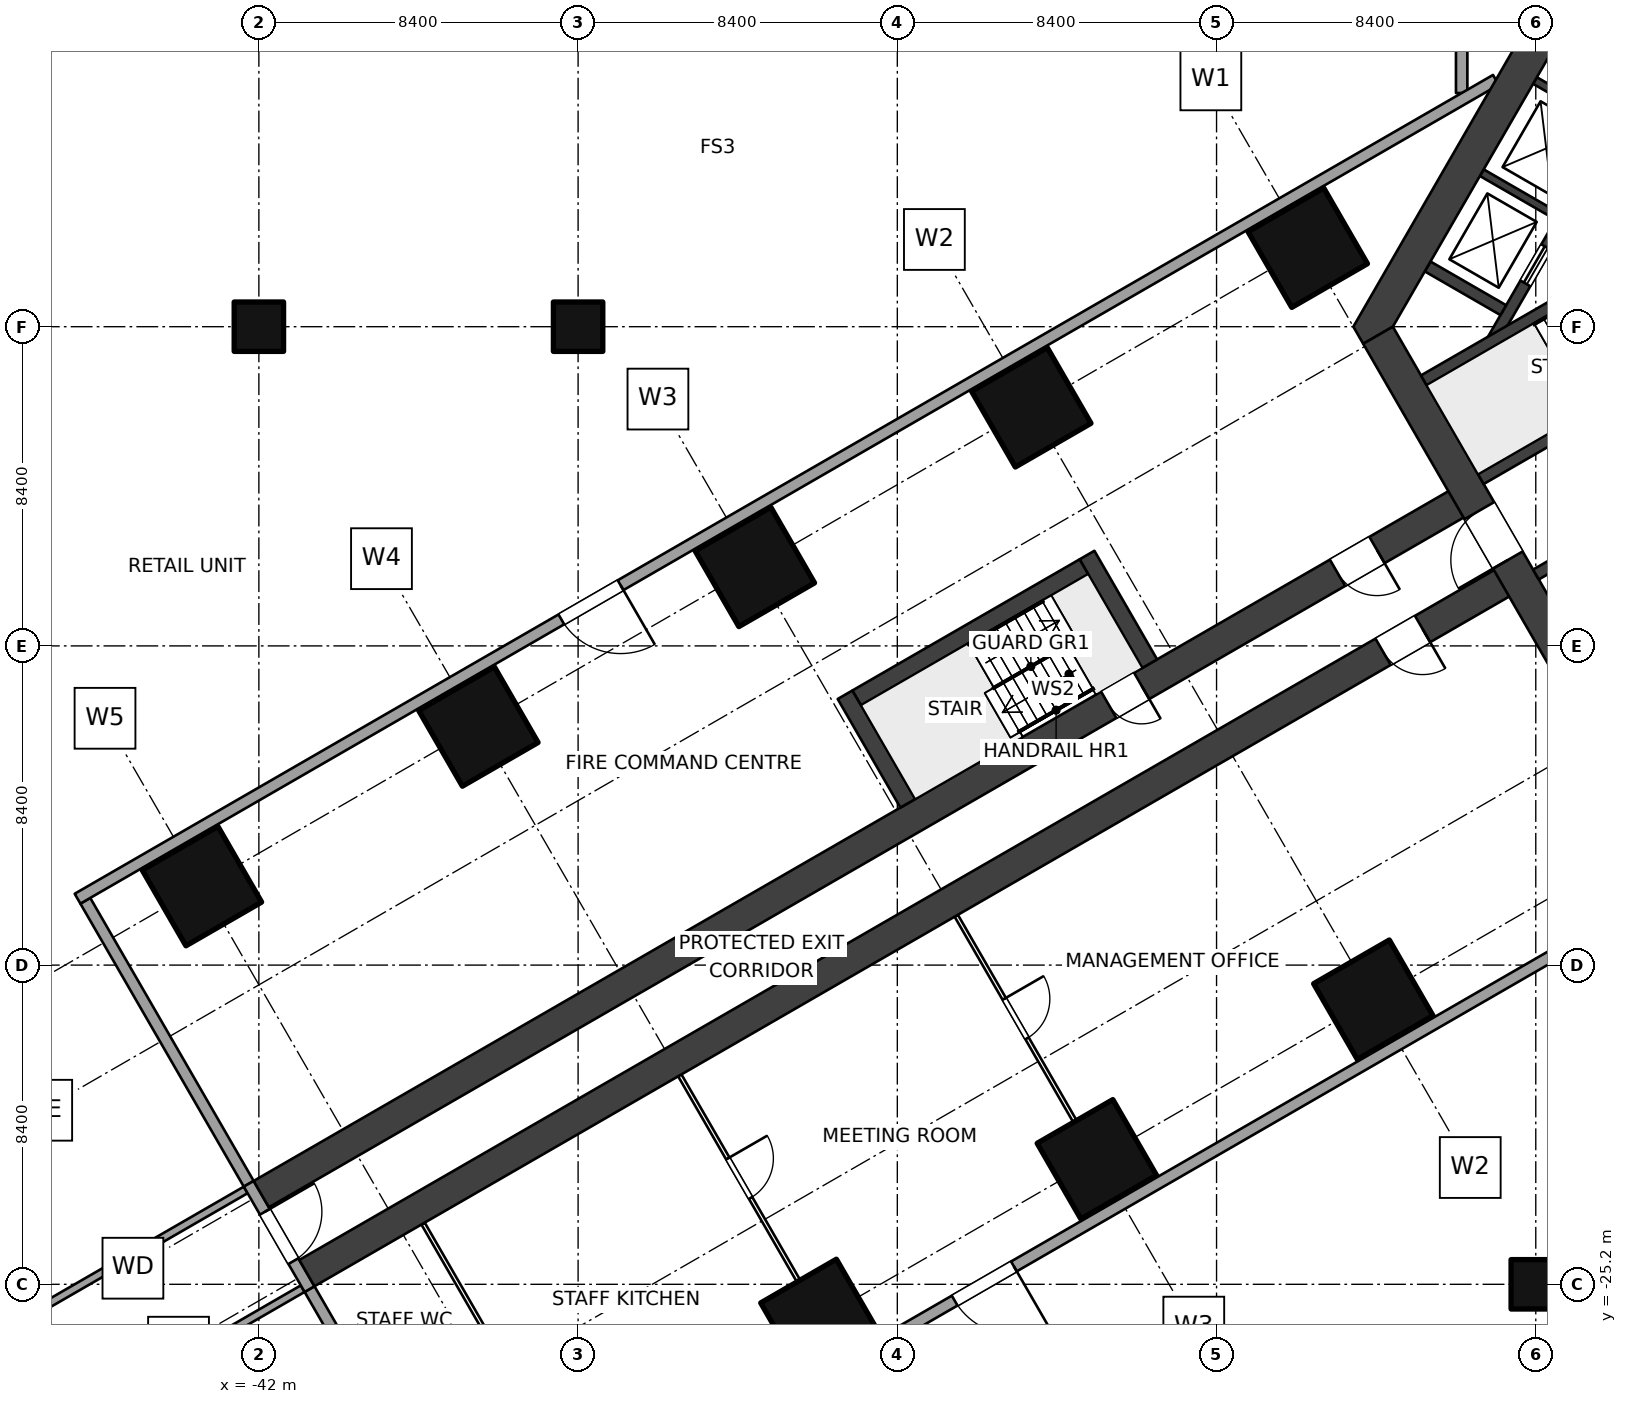
"""IFC4 building model, lengths in metres.
Left out: names, types, materials, properties, quantities, classifications, styles, units other than length and angle.
Written with IfcOpenShell. Run it as: python <this file> out.ifc"""

import sys

from ifc_helpers import new_model, si_unit, direction, frame, frame_2d, origin, origin_2d, place, context, subcontext, project, spatial, polyline, rectangle, outline, extrude, element, fill, save


model = new_model("IFC4")
c1 = context("Model", 3, precision=1e-05, world=origin(), true_north=direction((0.0, 1.0)))
c2 = subcontext(c1, "Body", "Model", "MODEL_VIEW")
j1 = project(units=[si_unit("LENGTHUNIT", "METRE"), si_unit("PLANEANGLEUNIT", "RADIAN")], contexts=[c1])
p1 = place(None, origin())
s1 = spatial("IfcSite", under=j1, at=p1, CompositionType="ELEMENT")
p2 = place(p1, origin())
s2 = spatial("IfcBuilding", under=s1, at=p2, CompositionType="ELEMENT")
p3 = place(p2, origin())
s3 = spatial("IfcBuildingStorey", under=s2, at=p3, CompositionType="ELEMENT", Elevation=0.0)
for number, where, z_axis, x_axis in (
    (1, (-14.4, 2.078, 0.0), (0.0, 0.0, 1.0), (-0.5, 0.866, 0.0)),
    (2, (-12.675, -17.71, 0.0), (0.0, 0.0, 1.0), (-0.5, 0.866, 0.0)),
    (3, (-21.675, -2.122, 0.0), (0.0, 0.0, 1.0), (-0.5, 0.866, 0.0)),
    (4, (-19.949, -21.91, 0.0), (0.0, 0.0, 1.0), (-0.5, 0.866, 0.0)),
    (5, (-28.949, -6.322, 0.0), (0.0, 0.0, 1.0), (-0.5, 0.866, 0.0)),
    (6, (-27.224, -26.11, 0.0), (0.0, 0.0, 1.0), (-0.5, 0.866, 0.0)),
    (7, (-36.224, -10.521, 0.0), (0.0, 0.0, 1.0), (-0.5, 0.866, 0.0)),
    (8, (-43.499, -14.721, 0.0), (0.0, 0.0, 1.0), (-0.5, 0.866, 0.0)),
):
    element("IfcColumn", number, at=place(p3, frame(where, z_axis=z_axis, x_axis=x_axis)), inside=s3, PredefinedType="COLUMN", context=c2, shape_type="SweptSolid", body=[
        extrude(rectangle(XDim=2.3, YDim=2.3, at=origin_2d()), origin(), (0.0, 0.0, 1.0), 6.0),
    ])
for number, where, z_axis, x_axis in (
    (9, (-42.0, 0.0, 0.0), (0.0, 0.0, 1.0), (1.0, 0.0, 0.0)),
    (10, (-33.6, 0.0, 0.0), (0.0, 0.0, 1.0), (1.0, 0.0, 0.0)),
    (11, (-8.4, -25.2, 0.0), (0.0, 0.0, 1.0), (1.0, 0.0, 0.0)),
):
    element("IfcColumn", number, at=place(p3, frame(where, z_axis=z_axis, x_axis=x_axis)), inside=s3, PredefinedType="COLUMN", context=c2, shape_type="SweptSolid", body=[
        extrude(rectangle(XDim=1.3, YDim=1.3, at=origin_2d()), origin(), (0.0, 0.0, 1.0), 6.0),
    ])
p4 = place(p3, frame((-6.47, -10.757, 0.0), z_axis=(0.0, 0.0, 1.0), x_axis=(-0.499997612506, 0.8660267822, 0.0)))
e12 = element("IfcWall", 12, at=p4, inside=s3, PredefinedType="SHEAR", context=c2, shape_type="SweptSolid", body=[
    extrude(rectangle(XDim=12.161, YDim=0.9, at=frame_2d((6.08, 0.0))), origin(), (0.0, 0.0, 1.0), 6.0),
])
p5 = place(p4, frame((5.33, 0.0, 0.0)))
e13 = element("IfcOpeningElement", 13, at=p5, cuts=e12, PredefinedType="OPENING", context=c2, shape_type="SweptSolid", body=[
    extrude(rectangle(XDim=1.5, YDim=2.1, at=frame_2d((0.75, 1.05))), frame((0.0, 0.46, 0.0), z_axis=(0.0, -1.0, 0.0), x_axis=(1.0, 0.0, 0.0)), (0.0, 0.0, 1.0), 0.92),
])
p6 = place(p3, origin())
e14 = element("IfcWall", 14, at=p6, inside=s3, PredefinedType="SHEAR", context=c2, shape_type="SweptSolid", body=[
    extrude(outline(polyline([(-6.6, 11.432), (-13.2, 0.0), (-12.94, -0.45), (-12.161, 0.0), (-6.08, 10.531), (-6.08, 11.432), (-6.6, 11.432)])), origin(), (0.0, 0.0, 1.0), 6.0),
])
p7 = place(p3, frame((-3.869, -0.559, 0.0), z_axis=(0.0, 0.0, 1.0), x_axis=(-0.86602711848, -0.499997030048, 0.0)))
e15 = element("IfcWall", 15, at=p7, inside=s3, PredefinedType="SHEAR", context=c2, shape_type="SweptSolid", body=[
    extrude(rectangle(XDim=6.901, YDim=0.3, at=frame_2d((3.451, 0.0))), origin(), (0.0, 0.0, 1.0), 6.0),
])
p8 = place(p7, frame((0.25, 0.0, 0.0)))
e16 = element("IfcOpeningElement", 16, at=p8, cuts=e15, PredefinedType="OPENING", context=c2, shape_type="SweptSolid", body=[
    extrude(rectangle(XDim=1.0, YDim=2.1, at=frame_2d((0.5, 1.05))), frame((0.0, 0.16, 0.0), z_axis=(0.0, -1.0, 0.0), x_axis=(1.0, 0.0, 0.0)), (0.0, 0.0, 1.0), 0.32),
])
p9 = place(p3, frame((-5.369, 2.039, 0.0), z_axis=(0.0, 0.0, 1.0), x_axis=(-0.86602711848, -0.499997030048, 0.0)))
e17 = element("IfcWall", 17, at=p9, inside=s3, PredefinedType="SHEAR", context=c2, shape_type="SweptSolid", body=[
    extrude(rectangle(XDim=6.901, YDim=0.3, at=frame_2d((3.451, 0.0))), origin(), (0.0, 0.0, 1.0), 6.0),
])
p10 = place(p3, frame((-2.419, -3.071, 0.0), z_axis=(0.0, 0.0, 1.0), x_axis=(-0.86602711848, -0.499997030048, 0.0)))
e18 = element("IfcWall", 18, at=p10, inside=s3, PredefinedType="SHEAR", context=c2, shape_type="SweptSolid", body=[
    extrude(rectangle(XDim=6.901, YDim=0.3, at=frame_2d((3.451, 0.0))), origin(), (0.0, 0.0, 1.0), 6.0),
])
p11 = place(p10, frame((4.85, 0.0, 0.0)))
e19 = element("IfcOpeningElement", 19, at=p11, cuts=e18, PredefinedType="OPENING", context=c2, shape_type="SweptSolid", body=[
    extrude(rectangle(XDim=1.1, YDim=2.1, at=frame_2d((0.55, 1.05))), frame((0.0, 0.16, 0.0), z_axis=(0.0, -1.0, 0.0), x_axis=(1.0, 0.0, 0.0)), (0.0, 0.0, 1.0), 0.32),
])
p12 = place(p3, frame((-9.548, -0.374, 0.0), z_axis=(0.0, 0.0, 1.0), x_axis=(0.500002290144, 0.866024081565, 0.0)))
e20 = element("IfcWall", 20, at=p12, inside=s3, PredefinedType="SHEAR", context=c2, shape_type="SweptSolid", body=[
    extrude(rectangle(XDim=10.195, YDim=0.3, at=frame_2d((5.098, 0.0))), origin(), (0.0, 0.0, 1.0), 6.0),
])
p13 = place(p12, frame((1.748, 0.0, 0.0)))
e21 = element("IfcOpeningElement", 21, at=p13, cuts=e20, PredefinedType="OPENING", context=c2, shape_type="SweptSolid", body=[
    extrude(rectangle(XDim=1.1, YDim=2.1, at=frame_2d((0.55, 1.05))), frame((0.0, 0.16, 0.0), z_axis=(0.0, -1.0, 0.0), x_axis=(1.0, 0.0, 0.0)), (0.0, 0.0, 1.0), 0.32),
])
p14 = place(p12, frame((4.548, 0.0, 0.0)))
e22 = element("IfcOpeningElement", 22, at=p14, cuts=e20, PredefinedType="OPENING", context=c2, shape_type="SweptSolid", body=[
    extrude(rectangle(XDim=1.1, YDim=2.1, at=frame_2d((0.55, 1.05))), frame((0.0, 0.16, 0.0), z_axis=(0.0, -1.0, 0.0), x_axis=(1.0, 0.0, 0.0)), (0.0, 0.0, 1.0), 0.32),
])
p15 = place(p12, frame((7.348, 0.0, 0.0)))
e23 = element("IfcOpeningElement", 23, at=p15, cuts=e20, PredefinedType="OPENING", context=c2, shape_type="SweptSolid", body=[
    extrude(rectangle(XDim=1.1, YDim=2.1, at=frame_2d((0.55, 1.05))), frame((0.0, 0.16, 0.0), z_axis=(0.0, -1.0, 0.0), x_axis=(1.0, 0.0, 0.0)), (0.0, 0.0, 1.0), 0.32),
])
p16 = place(p3, frame((-9.254, 0.435, 0.0), z_axis=(0.0, 0.0, 1.0), x_axis=(-0.866007057882, 0.500031774688, 0.0)))
e24 = element("IfcWall", 24, at=p16, inside=s3, PredefinedType="SHEAR", context=c2, shape_type="SweptSolid", body=[
    extrude(rectangle(XDim=2.3, YDim=0.3, at=frame_2d((1.15, 0.0))), origin(), (0.0, 0.0, 1.0), 6.0),
])
for number, where, z_axis, x_axis in (
    (25, (-7.829, 2.903, 0.0), (0.0, 0.0, 1.0), (-0.866, 0.5, 0.0)),
    (26, (-6.429, 5.328, 0.0), (0.0, 0.0, 1.0), (-0.866, 0.5, 0.0)),
):
    element("IfcWall", number, at=place(p3, frame(where, z_axis=z_axis, x_axis=x_axis)), inside=s3, PredefinedType="SHEAR", context=c2, shape_type="SweptSolid", body=[
        extrude(rectangle(XDim=2.3, YDim=0.2, at=frame_2d((1.15, 0.0))), origin(), (0.0, 0.0, 1.0), 6.0),
    ])
p17 = place(p3, frame((-8.91, -6.53, 0.0), z_axis=(0.0, 0.0, 1.0), x_axis=(-0.866025284237, -0.500000207062, 0.0)))
e27 = element("IfcWall", 27, at=p17, inside=s3, PredefinedType="SHEAR", context=c2, shape_type="SweptSolid", body=[
    extrude(rectangle(XDim=36.75, YDim=0.8, at=frame_2d((18.375, 0.0))), origin(), (0.0, 0.0, 1.0), 6.0),
])
p18 = place(p17, frame((2.85, 0.0, 0.0)))
e28 = element("IfcOpeningElement", 28, at=p18, cuts=e27, PredefinedType="OPENING", context=c2, shape_type="SweptSolid", body=[
    extrude(rectangle(XDim=1.2, YDim=2.1, at=frame_2d((0.6, 1.05))), frame((0.0, 0.41, 0.0), z_axis=(0.0, -1.0, 0.0), x_axis=(1.0, 0.0, 0.0)), (0.0, 0.0, 1.0), 0.82),
])
p19 = place(p3, frame((-10.11, -4.451, 0.0), z_axis=(0.0, 0.0, 1.0), x_axis=(-0.866025284237, -0.500000207062, 0.0)))
e29 = element("IfcWall", 29, at=p19, inside=s3, PredefinedType="SHEAR", context=c2, shape_type="SweptSolid", body=[
    extrude(rectangle(XDim=36.75, YDim=0.8, at=frame_2d((18.375, 0.0))), origin(), (0.0, 0.0, 1.0), 6.0),
])
p20 = place(p19, frame((10.0, 0.0, 0.0)))
e30 = element("IfcOpeningElement", 30, at=p20, cuts=e29, PredefinedType="OPENING", context=c2, shape_type="SweptSolid", body=[
    extrude(rectangle(XDim=1.0, YDim=2.1, at=frame_2d((0.5, 1.05))), frame((0.0, 0.41, 0.0), z_axis=(0.0, -1.0, 0.0), x_axis=(1.0, 0.0, 0.0)), (0.0, 0.0, 1.0), 0.82),
])
p21 = place(p19, frame((2.85, 0.0, 0.0)))
e31 = element("IfcOpeningElement", 31, at=p21, cuts=e29, PredefinedType="OPENING", context=c2, shape_type="SweptSolid", body=[
    extrude(rectangle(XDim=1.2, YDim=2.1, at=frame_2d((0.6, 1.05))), frame((0.0, 0.41, 0.0), z_axis=(0.0, -1.0, 0.0), x_axis=(1.0, 0.0, 0.0)), (0.0, 0.0, 1.0), 0.82),
])
p22 = place(p3, frame((-23.649, -15.501, 0.0), z_axis=(0.0, 0.0, 1.0), x_axis=(0.500004234368, -0.866022959057, 0.0)))
e32 = element("IfcWall", 32, at=p22, inside=s3, PredefinedType="PARTITIONING", context=c2, shape_type="SweptSolid", body=[
    extrude(rectangle(XDim=6.25, YDim=0.1, at=frame_2d((3.125, 0.0))), origin(), (0.0, 0.0, 1.0), 3.9),
])
p23 = place(p22, frame((2.525, 0.0, 0.0)))
e33 = element("IfcOpeningElement", 33, at=p23, cuts=e32, PredefinedType="OPENING", context=c2, shape_type="SweptSolid", body=[
    extrude(rectangle(XDim=1.2, YDim=2.1, at=frame_2d((0.6, 1.05))), frame((0.0, 0.06, 0.0), z_axis=(0.0, -1.0, 0.0), x_axis=(1.0, 0.0, 0.0)), (0.0, 0.0, 1.0), 0.12),
])
p24 = place(p3, frame((-30.924, -19.701, 0.0), z_axis=(0.0, 0.0, 1.0), x_axis=(0.500004234368, -0.866022959057, 0.0)))
e34 = element("IfcWall", 34, at=p24, inside=s3, PredefinedType="PARTITIONING", context=c2, shape_type="SweptSolid", body=[
    extrude(rectangle(XDim=6.25, YDim=0.1, at=frame_2d((3.125, 0.0))), origin(), (0.0, 0.0, 1.0), 3.9),
])
p25 = place(p24, frame((2.525, 0.0, 0.0)))
e35 = element("IfcOpeningElement", 35, at=p25, cuts=e34, PredefinedType="OPENING", context=c2, shape_type="SweptSolid", body=[
    extrude(rectangle(XDim=1.2, YDim=2.1, at=frame_2d((0.6, 1.05))), frame((0.0, 0.06, 0.0), z_axis=(0.0, -1.0, 0.0), x_axis=(1.0, 0.0, 0.0)), (0.0, 0.0, 1.0), 0.12),
])
p26 = place(p3, frame((-37.679, -23.601, 0.0), z_axis=(0.0, 0.0, 1.0), x_axis=(0.499994284652, -0.866028703517, 0.0)))
e36 = element("IfcWall", 36, at=p26, inside=s3, PredefinedType="PARTITIONING", context=c2, shape_type="SweptSolid", body=[
    extrude(rectangle(XDim=4.25, YDim=0.1, at=frame_2d((2.125, 0.0))), origin(), (0.0, 0.0, 1.0), 3.9),
])
p27 = place(p3, frame((-42.267, -22.555, 0.0), z_axis=(0.0, 0.0, 1.0), x_axis=(0.499971222258, -0.866042017984, 0.0)))
e37 = element("IfcWall", 37, at=p27, inside=s3, PredefinedType="SOLIDWALL", context=c2, shape_type="SweptSolid", body=[
    extrude(rectangle(XDim=3.2, YDim=0.3, at=frame_2d((1.6, 0.0))), origin(), (0.0, 0.0, 1.0), 5.7),
])
p28 = place(p27, frame((0.85, 0.0, 0.0)))
e38 = element("IfcOpeningElement", 38, at=p28, cuts=e37, PredefinedType="OPENING", context=c2, shape_type="SweptSolid", body=[
    extrude(rectangle(XDim=1.5, YDim=2.1, at=frame_2d((0.75, 1.05))), frame((0.0, 0.16, 0.0), z_axis=(0.0, -1.0, 0.0), x_axis=(1.0, 0.0, 0.0)), (0.0, 0.0, 1.0), 0.32),
])
p29 = place(p3, frame((-40.846, -25.315, 0.0), z_axis=(0.0, 0.0, 1.0), x_axis=(-0.866028443642, -0.499994734776, 0.0)))
e39 = element("IfcWall", 39, at=p29, inside=s3, PredefinedType="SOLIDWALL", context=c2, shape_type="SweptSolid", body=[
    extrude(rectangle(XDim=10.685, YDim=0.2, at=frame_2d((5.343, 0.0))), origin(), (0.0, 0.0, 1.0), 5.7),
])
p30 = place(p29, frame((4.593, 0.0, 0.0)))
e40 = element("IfcOpeningElement", 40, at=p30, cuts=e39, PredefinedType="OPENING", context=c2, shape_type="SweptSolid", body=[
    extrude(rectangle(XDim=1.5, YDim=2.1, at=frame_2d((0.75, 1.05))), frame((0.0, 0.11, 0.0), z_axis=(0.0, -1.0, 0.0), x_axis=(1.0, 0.0, 0.0)), (0.0, 0.0, 1.0), 0.22),
])
p31 = place(p3, frame((-42.346, -22.717, 0.0), z_axis=(0.0, 0.0, 1.0), x_axis=(-0.866038004836, -0.499978173704, 0.0)))
e41 = element("IfcWall", 41, at=p31, inside=s3, PredefinedType="SOLIDWALL", context=c2, shape_type="SweptSolid", body=[
    extrude(rectangle(XDim=8.953, YDim=0.2, at=frame_2d((4.477, 0.0))), origin(), (0.0, 0.0, 1.0), 5.7),
])
for number, where, z_axis, x_axis in (
    (42, (-40.667, -25.326, 0.0), (0.0, 0.0, 1.0), (0.5, -0.866, 0.0)),
    (43, (-42.267, -22.555, 0.0), (0.0, 0.0, 1.0), (-0.5, 0.866, 0.0)),
):
    element("IfcWall", number, at=place(p3, frame(where, z_axis=z_axis, x_axis=x_axis)), inside=s3, PredefinedType="SOLIDWALL", context=c2, shape_type="SweptSolid", body=[
        extrude(rectangle(XDim=8.6, YDim=0.3, at=frame_2d((4.3, 0.0))), origin(), (0.0, 0.0, 1.0), 4.1),
    ])
p32 = place(p3, frame((-10.35, 6.149, 0.0), z_axis=(0.0, 0.0, 1.0), x_axis=(0.0, 1.0, 0.0)))
e44 = element("IfcWall", 44, at=p32, inside=s3, PredefinedType="SOLIDWALL", context=c2, shape_type="SweptSolid", body=[
    extrude(rectangle(XDim=41.883, YDim=0.3, at=frame_2d((20.941, 0.0))), origin(), (0.0, 0.0, 1.0), 5.7),
])
p33 = place(p32, frame((25.383, 0.0, 0.0)))
e45 = element("IfcOpeningElement", 45, at=p33, cuts=e44, PredefinedType="OPENING", context=c2, shape_type="SweptSolid", body=[
    extrude(rectangle(XDim=1.8, YDim=2.4, at=frame_2d((0.9, 1.2))), frame((0.0, 0.16, 0.0), z_axis=(0.0, -1.0, 0.0), x_axis=(1.0, 0.0, 0.0)), (0.0, 0.0, 1.0), 0.32),
])
p34 = place(p3, frame((-0.15, -12.038, 0.0), z_axis=(0.0, 0.0, 1.0), x_axis=(-0.866026292622, -0.499998460486, 0.0)))
e46 = element("IfcWall", 46, at=p34, inside=s3, PredefinedType="SOLIDWALL", context=c2, shape_type="SweptSolid", body=[
    extrude(rectangle(XDim=41.883, YDim=0.3, at=frame_2d((20.941, 0.0))), origin(), (0.0, 0.0, 1.0), 5.7),
])
p35 = place(p34, frame((25.383, 0.0, 0.0)))
e47 = element("IfcOpeningElement", 47, at=p35, cuts=e46, PredefinedType="OPENING", context=c2, shape_type="SweptSolid", body=[
    extrude(rectangle(XDim=1.8, YDim=2.4, at=frame_2d((0.9, 1.2))), frame((0.0, 0.16, 0.0), z_axis=(0.0, -1.0, 0.0), x_axis=(1.0, 0.0, 0.0)), (0.0, 0.0, 1.0), 0.32),
])
p36 = place(p3, frame((-9.45, 6.495, 0.0), z_axis=(0.0, 0.0, 1.0), x_axis=(-0.866025301493, -0.500000177174, 0.0)))
e48 = element("IfcWall", 48, at=p36, inside=s3, PredefinedType="SOLIDWALL", context=c2, shape_type="SweptSolid", body=[
    extrude(rectangle(XDim=43.095, YDim=0.3, at=frame_2d((21.548, 0.0))), origin(), (0.0, 0.0, 1.0), 5.7),
])
p37 = place(p36, frame((26.595, 0.0, 0.0)))
e49 = element("IfcOpeningElement", 49, at=p37, cuts=e48, PredefinedType="OPENING", context=c2, shape_type="SweptSolid", body=[
    extrude(rectangle(XDim=1.8, YDim=2.4, at=frame_2d((0.9, 1.2))), frame((0.0, 0.16, 0.0), z_axis=(0.0, -1.0, 0.0), x_axis=(1.0, 0.0, 0.0)), (0.0, 0.0, 1.0), 0.32),
])
for number, where, z_axis, x_axis in (
    (50, (-18.559, -8.868, 0.0), (0.0, 0.0, 1.0), (-0.5, 0.866, 0.0)),
    (51, (-24.925, -12.543, 0.0), (0.0, 0.0, 1.0), (-0.5, 0.866, 0.0)),
):
    element("IfcWall", number, at=place(p3, frame(where, z_axis=z_axis, x_axis=x_axis)), inside=s3, PredefinedType="SOLIDWALL", context=c2, shape_type="SweptSolid", body=[
        extrude(rectangle(XDim=3.3, YDim=0.45, at=frame_2d((1.65, 0.0))), origin(), (0.0, 0.0, 1.0), 6.0),
    ])
p38 = place(p3, frame((-20.292, -6.317, 0.0), z_axis=(0.0, 0.0, 1.0), x_axis=(-0.866028853923, -0.499994024137, 0.0)))
e52 = element("IfcWall", 52, at=p38, inside=s3, PredefinedType="SOLIDWALL", context=c2, shape_type="SweptSolid", body=[
    extrude(rectangle(XDim=6.9, YDim=0.45, at=frame_2d((3.45, 0.0))), origin(), (0.0, 0.0, 1.0), 6.0),
])
p39 = place(p13, origin())
e53 = element("IfcDoor", 53, at=p39, inside=s3, OperationType="DOUBLE_DOOR_SLIDING", PredefinedType="DOOR", context=c2, shape_type="SweptSolid", body=[
    extrude(rectangle(XDim=1.1, YDim=2.1, at=frame_2d((0.55, 1.05))), frame((0.0, 0.025, 0.0), z_axis=(0.0, -1.0, 0.0), x_axis=(1.0, 0.0, 0.0)), (0.0, 0.0, 1.0), 0.05),
])
fill(e21, e53)
p40 = place(p5, origin())
e54 = element("IfcDoor", 54, at=p40, inside=s3, OperationType="DOUBLE_DOOR_DOUBLE_SWING", PredefinedType="DOOR", context=c2, shape_type="SweptSolid", body=[
    extrude(rectangle(XDim=1.5, YDim=2.1, at=frame_2d((0.75, 1.05))), frame((0.0, 0.025, 0.0), z_axis=(0.0, -1.0, 0.0), x_axis=(1.0, 0.0, 0.0)), (0.0, 0.0, 1.0), 0.05),
])
fill(e13, e54)
p41 = place(p20, origin())
e55 = element("IfcDoor", 55, at=p41, inside=s3, OperationType="SINGLE_SWING_LEFT", PredefinedType="DOOR", context=c2, shape_type="SweptSolid", body=[
    extrude(rectangle(XDim=1.0, YDim=2.1, at=frame_2d((0.5, 1.05))), frame((0.0, 0.025, 0.0), z_axis=(0.0, -1.0, 0.0), x_axis=(1.0, 0.0, 0.0)), (0.0, 0.0, 1.0), 0.05),
])
fill(e30, e55)
p42 = place(p23, origin())
e56 = element("IfcDoor", 56, at=p42, inside=s3, OperationType="DOUBLE_SWING_LEFT", PredefinedType="DOOR", context=c2, shape_type="SweptSolid", body=[
    extrude(rectangle(XDim=1.2, YDim=2.1, at=frame_2d((0.6, 1.05))), frame((0.0, 0.025, 0.0), z_axis=(0.0, -1.0, 0.0), x_axis=(1.0, 0.0, 0.0)), (0.0, 0.0, 1.0), 0.05),
])
fill(e33, e56)
p43 = place(p25, origin())
e57 = element("IfcDoor", 57, at=p43, inside=s3, OperationType="DOUBLE_SWING_LEFT", PredefinedType="DOOR", context=c2, shape_type="SweptSolid", body=[
    extrude(rectangle(XDim=1.2, YDim=2.1, at=frame_2d((0.6, 1.05))), frame((0.0, 0.025, 0.0), z_axis=(0.0, -1.0, 0.0), x_axis=(1.0, 0.0, 0.0)), (0.0, 0.0, 1.0), 0.05),
])
fill(e35, e57)
p44 = place(p18, origin())
e58 = element("IfcDoor", 58, at=p44, inside=s3, OperationType="DOUBLE_SWING_LEFT", PredefinedType="DOOR", context=c2, shape_type="SweptSolid", body=[
    extrude(rectangle(XDim=1.2, YDim=2.1, at=frame_2d((0.6, 1.05))), frame((0.0, 0.025, 0.0), z_axis=(0.0, -1.0, 0.0), x_axis=(1.0, 0.0, 0.0)), (0.0, 0.0, 1.0), 0.05),
])
fill(e28, e58)
p45 = place(p21, origin())
e59 = element("IfcDoor", 59, at=p45, inside=s3, OperationType="DOUBLE_SWING_LEFT", PredefinedType="DOOR", context=c2, shape_type="SweptSolid", body=[
    extrude(rectangle(XDim=1.2, YDim=2.1, at=frame_2d((0.6, 1.05))), frame((0.0, 0.025, 0.0), z_axis=(0.0, -1.0, 0.0), x_axis=(1.0, 0.0, 0.0)), (0.0, 0.0, 1.0), 0.05),
])
fill(e31, e59)
p46 = place(p28, origin())
e60 = element("IfcDoor", 60, at=p46, inside=s3, OperationType="DOUBLE_DOOR_DOUBLE_SWING", PredefinedType="DOOR", context=c2, shape_type="SweptSolid", body=[
    extrude(rectangle(XDim=1.5, YDim=2.1, at=frame_2d((0.75, 1.05))), frame((0.0, 0.025, 0.0), z_axis=(0.0, -1.0, 0.0), x_axis=(1.0, 0.0, 0.0)), (0.0, 0.0, 1.0), 0.05),
])
fill(e38, e60)
p47 = place(p35, origin())
e61 = element("IfcDoor", 61, at=p47, inside=s3, OperationType="DOUBLE_DOOR_DOUBLE_SWING", PredefinedType="DOOR", context=c2, shape_type="SweptSolid", body=[
    extrude(rectangle(XDim=1.8, YDim=2.4, at=frame_2d((0.9, 1.2))), frame((0.0, 0.025, 0.0), z_axis=(0.0, -1.0, 0.0), x_axis=(1.0, 0.0, 0.0)), (0.0, 0.0, 1.0), 0.05),
])
fill(e47, e61)
p48 = place(p37, origin())
e62 = element("IfcDoor", 62, at=p48, inside=s3, OperationType="DOUBLE_DOOR_DOUBLE_SWING", PredefinedType="DOOR", context=c2, shape_type="SweptSolid", body=[
    extrude(rectangle(XDim=1.8, YDim=2.4, at=frame_2d((0.9, 1.2))), frame((0.0, 0.025, 0.0), z_axis=(0.0, -1.0, 0.0), x_axis=(1.0, 0.0, 0.0)), (0.0, 0.0, 1.0), 0.05),
])
fill(e49, e62)
save(model, sys.argv[1])
